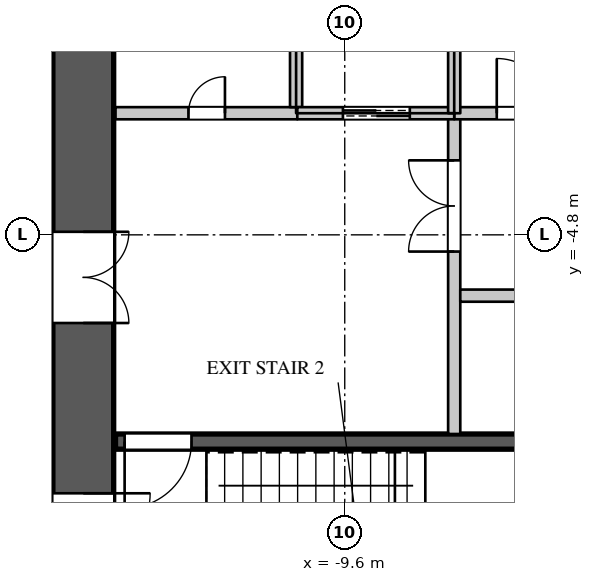
"""IFC4 building model, lengths in metres.
Left out: names, types, materials, properties, quantities, classifications, styles, units other than length and angle.
Written with IfcOpenShell. Run it as: python <this file> out.ifc"""

import sys

from ifc_helpers import new_model, si_unit, direction, frame, frame_2d, origin, place, context, subcontext, project, spatial, rectangle, extrude, element, fill, save


model = new_model("IFC4")
c1 = context("Model", 3, precision=1e-05, world=origin(), true_north=direction((0.0, 1.0)))
c2 = subcontext(c1, "Body", "Model", "MODEL_VIEW")
j1 = project(units=[si_unit("LENGTHUNIT", "METRE"), si_unit("PLANEANGLEUNIT", "RADIAN")], contexts=[c1])
p1 = place(None, origin())
s1 = spatial("IfcSite", under=j1, at=p1, CompositionType="ELEMENT")
p2 = place(p1, origin())
s2 = spatial("IfcBuilding", under=s1, at=p2, CompositionType="ELEMENT")
p3 = place(p2, frame((0.0, 0.0, 71.7)))
s3 = spatial("IfcBuildingStorey", under=s2, at=p3, CompositionType="ELEMENT", Elevation=71.7)
p4 = place(p3, frame((-13.9, -11.0, 0.0), z_axis=(0.0, 0.0, 1.0), x_axis=(0.0, 1.0, 0.0)))
e1 = element("IfcWall", 1, at=p4, inside=s3, PredefinedType="SHEAR", context=c2, shape_type="SweptSolid", body=[
    extrude(rectangle(XDim=22.0, YDim=1.0, at=frame_2d((11.0, 0.0))), origin(), (0.0, 0.0, 1.0), 4.2),
])
p5 = place(p4, frame((20.05, 0.0, 0.0)))
e2 = element("IfcOpeningElement", 2, at=p5, cuts=e1, PredefinedType="OPENING", context=c2, shape_type="SweptSolid", body=[
    extrude(rectangle(XDim=1.1, YDim=2.2, at=frame_2d((0.55, 1.1))), frame((0.0, 0.51, 0.0), z_axis=(0.0, -1.0, 0.0), x_axis=(1.0, 0.0, 0.0)), (0.0, 0.0, 1.0), 1.02),
])
p6 = place(p4, frame((0.85, 0.0, 0.0)))
e3 = element("IfcOpeningElement", 3, at=p6, cuts=e1, PredefinedType="OPENING", context=c2, shape_type="SweptSolid", body=[
    extrude(rectangle(XDim=1.1, YDim=2.2, at=frame_2d((0.55, 1.1))), frame((0.0, 0.51, 0.0), z_axis=(0.0, -1.0, 0.0), x_axis=(1.0, 0.0, 0.0)), (0.0, 0.0, 1.0), 1.02),
])
p7 = place(p4, frame((15.75, 0.0, 0.0)))
e4 = element("IfcOpeningElement", 4, at=p7, cuts=e1, PredefinedType="OPENING", context=c2, shape_type="SweptSolid", body=[
    extrude(rectangle(XDim=1.5, YDim=2.4, at=frame_2d((0.75, 1.2))), frame((0.0, 0.51, 0.0), z_axis=(0.0, -1.0, 0.0), x_axis=(1.0, 0.0, 0.0)), (0.0, 0.0, 1.0), 1.02),
])
p8 = place(p4, frame((4.75, 0.0, 0.0)))
e5 = element("IfcOpeningElement", 5, at=p8, cuts=e1, PredefinedType="OPENING", context=c2, shape_type="SweptSolid", body=[
    extrude(rectangle(XDim=1.5, YDim=2.4, at=frame_2d((0.75, 1.2))), frame((0.0, 0.51, 0.0), z_axis=(0.0, -1.0, 0.0), x_axis=(1.0, 0.0, 0.0)), (0.0, 0.0, 1.0), 1.02),
])
p9 = place(p3, frame((-7.8, -8.075, 0.0), z_axis=(0.0, 0.0, 1.0), x_axis=(0.0, 1.0, 0.0)))
e6 = element("IfcWall", 6, at=p9, inside=s3, PredefinedType="PARTITIONING", context=c2, shape_type="SweptSolid", body=[
    extrude(rectangle(XDim=5.275, YDim=0.2, at=frame_2d((2.637, 0.0))), origin(), (0.0, 0.0, 1.0), 3.95),
])
p10 = place(p9, frame((3.0, 0.0, 0.0)))
e7 = element("IfcOpeningElement", 7, at=p10, cuts=e6, PredefinedType="OPENING", context=c2, shape_type="SweptSolid", body=[
    extrude(rectangle(XDim=1.5, YDim=2.4, at=frame_2d((0.75, 1.2))), frame((0.0, 0.11, 0.0), z_axis=(0.0, -1.0, 0.0), x_axis=(1.0, 0.0, 0.0)), (0.0, 0.0, 1.0), 0.22),
])
p11 = place(p3, frame((-7.7, -5.8, 0.0), z_axis=(0.0, 0.0, 1.0), x_axis=(1.0, 0.0, 0.0)))
e8 = element("IfcWall", 8, at=p11, inside=s3, PredefinedType="PARTITIONING", context=c2, shape_type="SweptSolid", body=[
    extrude(rectangle(XDim=4.48, YDim=0.2, at=frame_2d((2.24, 0.0))), origin(), (0.0, 0.0, 1.0), 3.95),
])
p12 = place(p11, frame((1.75, 0.0, 0.0)))
e9 = element("IfcOpeningElement", 9, at=p12, cuts=e8, PredefinedType="OPENING", context=c2, shape_type="SweptSolid", body=[
    extrude(rectangle(XDim=0.9, YDim=2.2, at=frame_2d((0.45, 1.1))), frame((0.0, 0.11, 0.0), z_axis=(0.0, -1.0, 0.0), x_axis=(1.0, 0.0, 0.0)), (0.0, 0.0, 1.0), 0.22),
])
p13 = place(p3, frame((-13.37, -2.8, 0.0), z_axis=(0.0, 0.0, 1.0), x_axis=(1.0, 0.0, 0.0)))
e10 = element("IfcWall", 10, at=p13, inside=s3, PredefinedType="PARTITIONING", context=c2, shape_type="SweptSolid", body=[
    extrude(rectangle(XDim=2.99, YDim=0.2, at=frame_2d((1.495, 0.0))), origin(), (0.0, 0.0, 1.0), 3.95),
])
p14 = place(p13, frame((1.2, 0.0, 0.0)))
e11 = element("IfcOpeningElement", 11, at=p14, cuts=e10, PredefinedType="OPENING", context=c2, shape_type="SweptSolid", body=[
    extrude(rectangle(XDim=0.6, YDim=2.0, at=frame_2d((0.3, 1.0))), frame((0.0, 0.11, 0.0), z_axis=(0.0, -1.0, 0.0), x_axis=(1.0, 0.0, 0.0)), (0.0, 0.0, 1.0), 0.22),
])
p15 = place(p3, frame((-7.8, -2.8, 0.0), z_axis=(0.0, 0.0, 1.0), x_axis=(1.0, 0.0, 0.0)))
e12 = element("IfcWall", 12, at=p15, inside=s3, PredefinedType="PARTITIONING", context=c2, shape_type="SweptSolid", body=[
    extrude(rectangle(XDim=2.38, YDim=0.2, at=frame_2d((1.19, 0.0))), origin(), (0.0, 0.0, 1.0), 3.95),
])
p16 = place(p15, frame((0.7, 0.0, 0.0)))
e13 = element("IfcOpeningElement", 13, at=p16, cuts=e12, PredefinedType="OPENING", context=c2, shape_type="SweptSolid", body=[
    extrude(rectangle(XDim=0.9, YDim=2.2, at=frame_2d((0.45, 1.1))), frame((0.0, 0.11, 0.0), z_axis=(0.0, -1.0, 0.0), x_axis=(1.0, 0.0, 0.0)), (0.0, 0.0, 1.0), 0.22),
])
p17 = place(p3, frame((-10.4, -2.7, 0.0), z_axis=(0.0, 0.0, 1.0), x_axis=(0.0, 1.0, 0.0)))
e14 = element("IfcWall", 14, at=p17, inside=s3, PredefinedType="PARTITIONING", context=c2, shape_type="SweptSolid", body=[
    extrude(rectangle(XDim=2.7, YDim=0.2, at=frame_2d((1.35, 0.0))), origin(), (0.0, 0.0, 1.0), 3.95),
])
p18 = place(p3, frame((-10.38, -2.8, 0.0), z_axis=(0.0, 0.0, 1.0), x_axis=(1.0, 0.0, 0.0)))
e15 = element("IfcWall", 15, at=p18, inside=s3, PredefinedType="PARTITIONING", context=c2, shape_type="SweptSolid", body=[
    extrude(rectangle(XDim=2.58, YDim=0.2, at=frame_2d((1.29, 0.0))), origin(), (0.0, 0.0, 1.0), 3.95),
])
p19 = place(p18, frame((0.75, 0.0, 0.0)))
e16 = element("IfcOpeningElement", 16, at=p19, cuts=e15, PredefinedType="OPENING", context=c2, shape_type="SweptSolid", body=[
    extrude(rectangle(XDim=1.1, YDim=2.2, at=frame_2d((0.55, 1.1))), frame((0.0, 0.11, 0.0), z_axis=(0.0, -1.0, 0.0), x_axis=(1.0, 0.0, 0.0)), (0.0, 0.0, 1.0), 0.22),
])
p20 = place(p3, frame((-7.8, -2.8, 0.0), z_axis=(0.0, 0.0, 1.0), x_axis=(0.0, 1.0, 0.0)))
e17 = element("IfcWall", 17, at=p20, inside=s3, PredefinedType="PARTITIONING", context=c2, shape_type="SweptSolid", body=[
    extrude(rectangle(XDim=2.8, YDim=0.2, at=frame_2d((1.4, 0.0))), origin(), (0.0, 0.0, 1.0), 3.95),
])
p21 = place(p3, frame((-13.37, -8.2, 0.0), z_axis=(0.0, 0.0, 1.0), x_axis=(1.0, 0.0, 0.0)))
e18 = element("IfcWall", 18, at=p21, inside=s3, PredefinedType="SHEAR", context=c2, shape_type="SweptSolid", body=[
    extrude(rectangle(XDim=8.095, YDim=0.25, at=frame_2d((4.048, 0.0))), origin(), (0.0, 0.0, 1.0), 3.95),
])
p22 = place(p21, frame((0.15, 0.0, 0.0)))
e19 = element("IfcOpeningElement", 19, at=p22, cuts=e18, PredefinedType="OPENING", context=c2, shape_type="SweptSolid", body=[
    extrude(rectangle(XDim=1.1, YDim=2.2, at=frame_2d((0.55, 1.1))), frame((0.0, 0.135, 0.0), z_axis=(0.0, -1.0, 0.0), x_axis=(1.0, 0.0, 0.0)), (0.0, 0.0, 1.0), 0.27),
])
p23 = place(p14, origin())
e20 = element("IfcDoor", 20, at=p23, inside=s3, OperationType="SINGLE_SWING_RIGHT", PredefinedType="DOOR", context=c2, shape_type="SweptSolid", body=[
    extrude(rectangle(XDim=0.6, YDim=2.0, at=frame_2d((0.3, 1.0))), frame((0.0, 0.025, 0.0), z_axis=(0.0, -1.0, 0.0), x_axis=(1.0, 0.0, 0.0)), (0.0, 0.0, 1.0), 0.05),
])
fill(e11, e20)
p24 = place(p16, origin())
e21 = element("IfcDoor", 21, at=p24, inside=s3, OperationType="SINGLE_SWING_LEFT", PredefinedType="DOOR", context=c2, shape_type="SweptSolid", body=[
    extrude(rectangle(XDim=0.9, YDim=2.2, at=frame_2d((0.45, 1.1))), frame((0.0, 0.025, 0.0), z_axis=(0.0, -1.0, 0.0), x_axis=(1.0, 0.0, 0.0)), (0.0, 0.0, 1.0), 0.05),
])
fill(e13, e21)
p25 = place(p19, origin())
e22 = element("IfcDoor", 22, at=p25, inside=s3, OperationType="DOUBLE_DOOR_SLIDING", PredefinedType="DOOR", context=c2, shape_type="SweptSolid", body=[
    extrude(rectangle(XDim=1.1, YDim=2.2, at=frame_2d((0.55, 1.1))), frame((0.0, 0.025, 0.0), z_axis=(0.0, -1.0, 0.0), x_axis=(1.0, 0.0, 0.0)), (0.0, 0.0, 1.0), 0.05),
])
fill(e16, e22)
p26 = place(p22, origin())
e23 = element("IfcDoor", 23, at=p26, inside=s3, OperationType="SINGLE_SWING_RIGHT", PredefinedType="DOOR", context=c2, shape_type="SweptSolid", body=[
    extrude(rectangle(XDim=1.1, YDim=2.2, at=frame_2d((0.55, 1.1))), frame((0.0, 0.025, 0.0), z_axis=(0.0, -1.0, 0.0), x_axis=(1.0, 0.0, 0.0)), (0.0, 0.0, 1.0), 0.05),
])
fill(e19, e23)
p27 = place(p10, origin())
e24 = element("IfcDoor", 24, at=p27, inside=s3, OperationType="DOUBLE_DOOR_SINGLE_SWING", PredefinedType="DOOR", context=c2, shape_type="SweptSolid", body=[
    extrude(rectangle(XDim=1.5, YDim=2.4, at=frame_2d((0.75, 1.2))), frame((0.0, 0.025, 0.0), z_axis=(0.0, -1.0, 0.0), x_axis=(1.0, 0.0, 0.0)), (0.0, 0.0, 1.0), 0.05),
])
fill(e7, e24)
p28 = place(p6, origin())
e25 = element("IfcDoor", 25, at=p28, inside=s3, OperationType="SINGLE_SWING_LEFT", PredefinedType="DOOR", context=c2, shape_type="SweptSolid", body=[
    extrude(rectangle(XDim=1.1, YDim=2.2, at=frame_2d((0.55, 1.1))), frame((0.0, -0.445, 0.0), z_axis=(0.0, -1.0, 0.0), x_axis=(1.0, 0.0, 0.0)), (0.0, 0.0, 1.0), 0.05),
])
fill(e3, e25)
p29 = place(p8, origin())
e26 = element("IfcDoor", 26, at=p29, inside=s3, OperationType="DOUBLE_DOOR_SINGLE_SWING", PredefinedType="DOOR", context=c2, shape_type="SweptSolid", body=[
    extrude(rectangle(XDim=1.5, YDim=2.4, at=frame_2d((0.75, 1.2))), frame((0.0, -0.445, 0.0), z_axis=(0.0, -1.0, 0.0), x_axis=(1.0, 0.0, 0.0)), (0.0, 0.0, 1.0), 0.05),
])
fill(e5, e26)
save(model, sys.argv[1])
